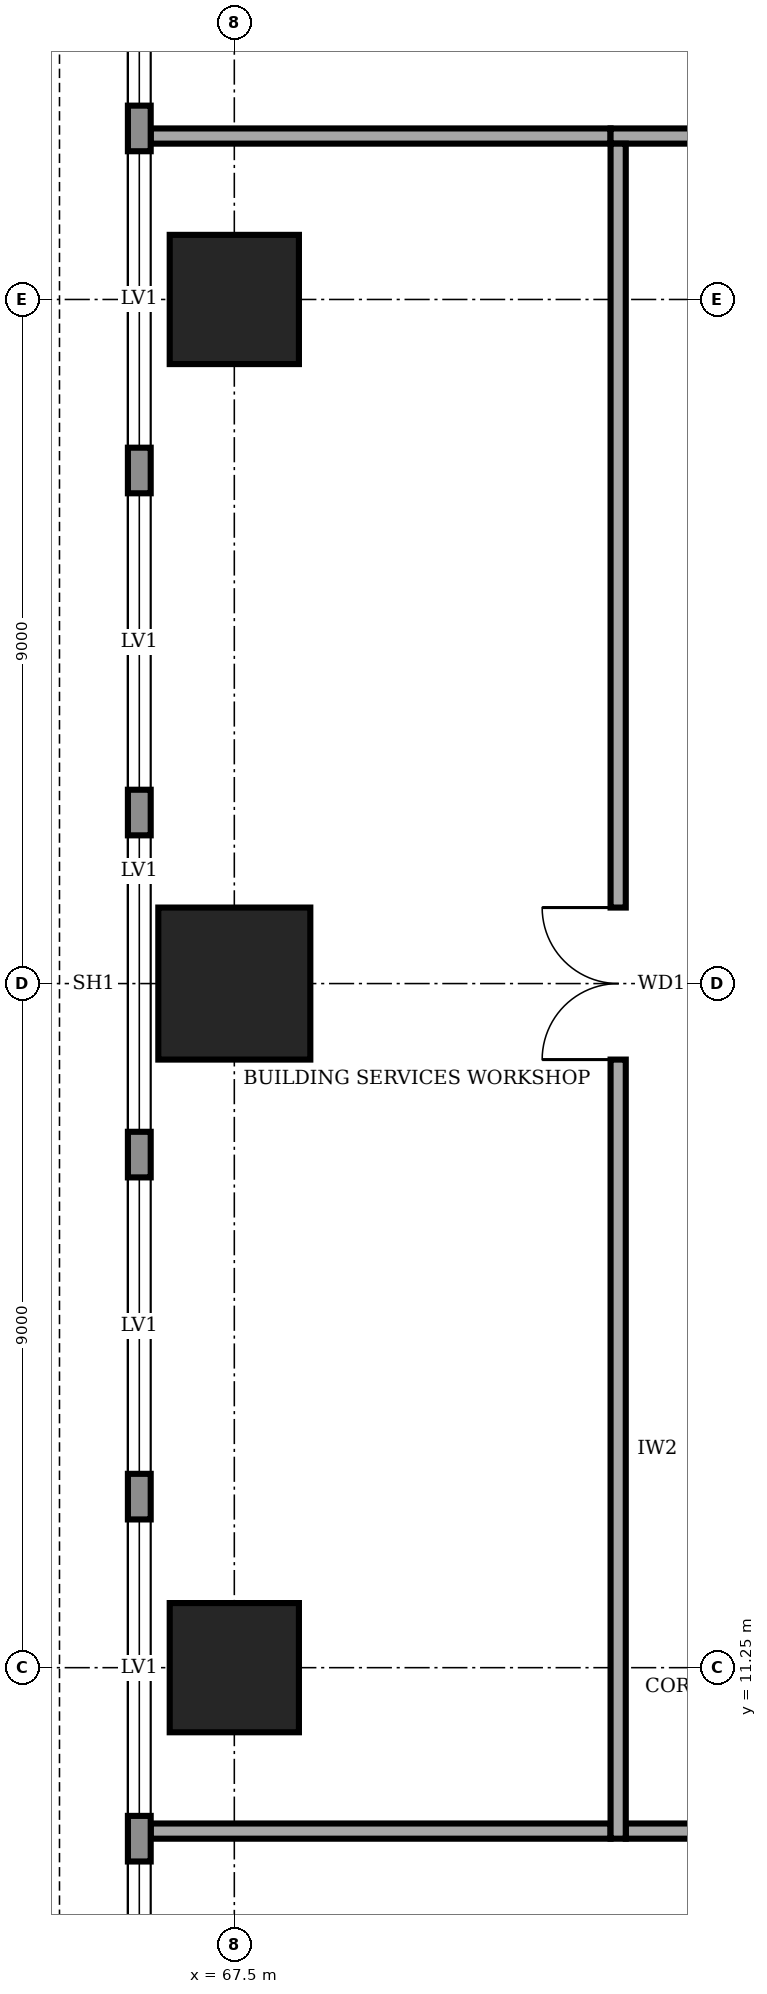
"""IFC4 building model, lengths in metres.
Left out: names, types, materials, properties, quantities, classifications, styles, units other than length and angle.
Written with IfcOpenShell. Run it as: python <this file> out.ifc"""

import sys

from ifc_helpers import new_model, si_unit, direction, frame, frame_2d, origin, origin_2d, place, context, subcontext, project, spatial, rectangle, extrude, element, fill, save


model = new_model("IFC4")
c1 = context("Model", 3, precision=1e-05, world=origin(), true_north=direction((0.0, 1.0)))
c2 = subcontext(c1, "Body", "Model", "MODEL_VIEW")
j1 = project(units=[si_unit("LENGTHUNIT", "METRE"), si_unit("PLANEANGLEUNIT", "RADIAN")], contexts=[c1])
p1 = place(None, origin())
s1 = spatial("IfcSite", under=j1, at=p1, CompositionType="ELEMENT")
p2 = place(p1, origin())
s2 = spatial("IfcBuilding", under=s1, at=p2, CompositionType="ELEMENT")
p3 = place(p2, frame((0.0, 0.0, 229.0)))
s3 = spatial("IfcBuildingStorey", under=s2, at=p3, CompositionType="ELEMENT", Elevation=229.0)
p4 = place(p3, frame((67.5, 11.25, 0.0), z_axis=(0.0, 0.0, 1.0), x_axis=(1.0, 0.0, 0.0)))
e1 = element("IfcColumn", 1, at=p4, inside=s3, PredefinedType="COLUMN", context=c2, shape_type="SweptSolid", body=[
    extrude(rectangle(XDim=1.7, YDim=1.7, at=origin_2d()), origin(), (0.0, 0.0, 1.0), 4.0),
])
p5 = place(p3, frame((67.5, 20.25, 0.0), z_axis=(0.0, 0.0, 1.0), x_axis=(1.0, 0.0, 0.0)))
e2 = element("IfcColumn", 2, at=p5, inside=s3, PredefinedType="COLUMN", context=c2, shape_type="SweptSolid", body=[
    extrude(rectangle(XDim=2.0, YDim=2.0, at=origin_2d()), origin(), (0.0, 0.0, 1.0), 4.0),
])
p6 = place(p3, frame((67.5, 29.25, 0.0), z_axis=(0.0, 0.0, 1.0), x_axis=(1.0, 0.0, 0.0)))
e3 = element("IfcColumn", 3, at=p6, inside=s3, PredefinedType="COLUMN", context=c2, shape_type="SweptSolid", body=[
    extrude(rectangle(XDim=1.7, YDim=1.7, at=origin_2d()), origin(), (0.0, 0.0, 1.0), 4.0),
])
p7 = place(p3, frame((66.25, 37.18, 0.0), z_axis=(0.0, 0.0, 1.0), x_axis=(0.0, -1.0, 0.0)))
e4 = element("IfcWall", 4, at=p7, inside=s3, PredefinedType="STANDARD", context=c2, shape_type="SweptSolid", body=[
    extrude(rectangle(XDim=33.86, YDim=0.3, at=frame_2d((16.93, 0.0))), origin(), (0.0, 0.0, 1.0), 3.75),
])
p8 = place(p7, frame((28.48, 0.0, 0.9)))
e5 = element("IfcOpeningElement", 5, at=p8, cuts=e4, PredefinedType="OPENING", context=c2, shape_type="SweptSolid", body=[
    extrude(rectangle(XDim=3.9, YDim=2.2, at=frame_2d((1.95, 1.1))), frame((0.0, 0.16, 0.0), z_axis=(0.0, -1.0, 0.0), x_axis=(1.0, 0.0, 0.0)), (0.0, 0.0, 1.0), 0.32),
])
p9 = place(p7, frame((23.98, 0.0, 0.9)))
e6 = element("IfcOpeningElement", 6, at=p9, cuts=e4, PredefinedType="OPENING", context=c2, shape_type="SweptSolid", body=[
    extrude(rectangle(XDim=3.9, YDim=2.2, at=frame_2d((1.95, 1.1))), frame((0.0, 0.16, 0.0), z_axis=(0.0, -1.0, 0.0), x_axis=(1.0, 0.0, 0.0)), (0.0, 0.0, 1.0), 0.32),
])
p10 = place(p7, frame((19.48, 0.0, 0.9)))
e7 = element("IfcOpeningElement", 7, at=p10, cuts=e4, PredefinedType="OPENING", context=c2, shape_type="SweptSolid", body=[
    extrude(rectangle(XDim=3.9, YDim=2.2, at=frame_2d((1.95, 1.1))), frame((0.0, 0.16, 0.0), z_axis=(0.0, -1.0, 0.0), x_axis=(1.0, 0.0, 0.0)), (0.0, 0.0, 1.0), 0.32),
])
p11 = place(p7, frame((14.98, 0.0, 0.9)))
e8 = element("IfcOpeningElement", 8, at=p11, cuts=e4, PredefinedType="OPENING", context=c2, shape_type="SweptSolid", body=[
    extrude(rectangle(XDim=3.9, YDim=2.2, at=frame_2d((1.95, 1.1))), frame((0.0, 0.16, 0.0), z_axis=(0.0, -1.0, 0.0), x_axis=(1.0, 0.0, 0.0)), (0.0, 0.0, 1.0), 0.32),
])
p12 = place(p7, frame((10.48, 0.0, 0.9)))
e9 = element("IfcOpeningElement", 9, at=p12, cuts=e4, PredefinedType="OPENING", context=c2, shape_type="SweptSolid", body=[
    extrude(rectangle(XDim=3.9, YDim=2.2, at=frame_2d((1.95, 1.1))), frame((0.0, 0.16, 0.0), z_axis=(0.0, -1.0, 0.0), x_axis=(1.0, 0.0, 0.0)), (0.0, 0.0, 1.0), 0.32),
])
p13 = place(p7, frame((5.98, 0.0, 0.9)))
e10 = element("IfcOpeningElement", 10, at=p13, cuts=e4, PredefinedType="OPENING", context=c2, shape_type="SweptSolid", body=[
    extrude(rectangle(XDim=3.9, YDim=2.2, at=frame_2d((1.95, 1.1))), frame((0.0, 0.16, 0.0), z_axis=(0.0, -1.0, 0.0), x_axis=(1.0, 0.0, 0.0)), (0.0, 0.0, 1.0), 0.32),
])
p14 = place(p7, frame((1.48, 0.0, 0.9)))
e11 = element("IfcOpeningElement", 11, at=p14, cuts=e4, PredefinedType="OPENING", context=c2, shape_type="SweptSolid", body=[
    extrude(rectangle(XDim=3.9, YDim=2.2, at=frame_2d((1.95, 1.1))), frame((0.0, 0.16, 0.0), z_axis=(0.0, -1.0, 0.0), x_axis=(1.0, 0.0, 0.0)), (0.0, 0.0, 1.0), 0.32),
])
p15 = place(p3, frame((72.65, 9.1, 0.0), z_axis=(0.0, 0.0, 1.0), x_axis=(1.0, 0.0, 0.0)))
e12 = element("IfcWall", 12, at=p15, inside=s3, PredefinedType="SOLIDWALL", context=c2, shape_type="SweptSolid", body=[
    extrude(rectangle(XDim=16.9, YDim=0.2, at=frame_2d((8.45, 0.0))), origin(), (0.0, 0.0, 1.0), 3.75),
])
p16 = place(p15, frame((7.15, 0.0, 0.0)))
e13 = element("IfcOpeningElement", 13, at=p16, cuts=e12, PredefinedType="OPENING", context=c2, shape_type="SweptSolid", body=[
    extrude(rectangle(XDim=2.4, YDim=2.7, at=frame_2d((1.2, 1.35))), frame((0.0, 0.11, 0.0), z_axis=(0.0, -1.0, 0.0), x_axis=(1.0, 0.0, 0.0)), (0.0, 0.0, 1.0), 0.22),
])
p17 = place(p3, frame((89.35, 31.4, 0.0), z_axis=(0.0, 0.0, 1.0), x_axis=(-1.0, 0.0, 0.0)))
e14 = element("IfcWall", 14, at=p17, inside=s3, PredefinedType="SOLIDWALL", context=c2, shape_type="SweptSolid", body=[
    extrude(rectangle(XDim=16.9, YDim=0.2, at=frame_2d((8.45, 0.0))), origin(), (0.0, 0.0, 1.0), 3.75),
])
p18 = place(p17, frame((11.425, 0.0, 0.0)))
e15 = element("IfcOpeningElement", 15, at=p18, cuts=e14, PredefinedType="OPENING", context=c2, shape_type="SweptSolid", body=[
    extrude(rectangle(XDim=2.4, YDim=2.7, at=frame_2d((1.2, 1.35))), frame((0.0, 0.11, 0.0), z_axis=(0.0, -1.0, 0.0), x_axis=(1.0, 0.0, 0.0)), (0.0, 0.0, 1.0), 0.22),
])
p19 = place(p17, frame((3.575, 0.0, 0.0)))
e16 = element("IfcOpeningElement", 16, at=p19, cuts=e14, PredefinedType="OPENING", context=c2, shape_type="SweptSolid", body=[
    extrude(rectangle(XDim=1.0, YDim=2.1, at=frame_2d((0.5, 1.05))), frame((0.0, 0.11, 0.0), z_axis=(0.0, -1.0, 0.0), x_axis=(1.0, 0.0, 0.0)), (0.0, 0.0, 1.0), 0.22),
])
p20 = place(p3, frame((72.55, 31.3, 0.0), z_axis=(0.0, 0.0, 1.0), x_axis=(0.0, -1.0, 0.0)))
e17 = element("IfcWall", 17, at=p20, inside=s3, PredefinedType="SOLIDWALL", context=c2, shape_type="SweptSolid", body=[
    extrude(rectangle(XDim=22.3, YDim=0.2, at=frame_2d((11.15, 0.0))), origin(), (0.0, 0.0, 1.0), 3.75),
])
p21 = place(p20, frame((10.05, 0.0, 0.0)))
e18 = element("IfcOpeningElement", 18, at=p21, cuts=e17, PredefinedType="OPENING", context=c2, shape_type="SweptSolid", body=[
    extrude(rectangle(XDim=2.0, YDim=2.1, at=frame_2d((1.0, 1.05))), frame((0.0, 0.11, 0.0), z_axis=(0.0, -1.0, 0.0), x_axis=(1.0, 0.0, 0.0)), (0.0, 0.0, 1.0), 0.22),
])
for number, where, z_axis, x_axis in (
    (19, (66.4, 9.1, 0.0), (0.0, 0.0, 1.0), (1.0, 0.0, 0.0)),
    (20, (66.4, 31.4, 0.0), (0.0, 0.0, 1.0), (1.0, 0.0, 0.0)),
):
    element("IfcWall", number, at=place(p3, frame(where, z_axis=z_axis, x_axis=x_axis)), inside=s3, PredefinedType="SOLIDWALL", context=c2, shape_type="SweptSolid", body=[
        extrude(rectangle(XDim=6.05, YDim=0.2, at=frame_2d((3.025, 0.0))), origin(), (0.0, 0.0, 1.0), 3.75),
    ])
p22 = place(p8, origin())
e21 = element("IfcWindow", 21, at=p22, inside=s3, PartitioningType="SINGLE_PANEL", PredefinedType="WINDOW", context=c2, shape_type="SweptSolid", body=[
    extrude(rectangle(XDim=3.9, YDim=2.2, at=frame_2d((1.95, 1.1))), frame((0.0, 0.03, 0.0), z_axis=(0.0, -1.0, 0.0), x_axis=(1.0, 0.0, 0.0)), (0.0, 0.0, 1.0), 0.06),
])
fill(e5, e21)
p23 = place(p9, origin())
e22 = element("IfcWindow", 22, at=p23, inside=s3, PartitioningType="SINGLE_PANEL", PredefinedType="WINDOW", context=c2, shape_type="SweptSolid", body=[
    extrude(rectangle(XDim=3.9, YDim=2.2, at=frame_2d((1.95, 1.1))), frame((0.0, 0.03, 0.0), z_axis=(0.0, -1.0, 0.0), x_axis=(1.0, 0.0, 0.0)), (0.0, 0.0, 1.0), 0.06),
])
fill(e6, e22)
p24 = place(p10, origin())
e23 = element("IfcWindow", 23, at=p24, inside=s3, PartitioningType="SINGLE_PANEL", PredefinedType="WINDOW", context=c2, shape_type="SweptSolid", body=[
    extrude(rectangle(XDim=3.9, YDim=2.2, at=frame_2d((1.95, 1.1))), frame((0.0, 0.03, 0.0), z_axis=(0.0, -1.0, 0.0), x_axis=(1.0, 0.0, 0.0)), (0.0, 0.0, 1.0), 0.06),
])
fill(e7, e23)
p25 = place(p11, origin())
e24 = element("IfcWindow", 24, at=p25, inside=s3, PartitioningType="SINGLE_PANEL", PredefinedType="WINDOW", context=c2, shape_type="SweptSolid", body=[
    extrude(rectangle(XDim=3.9, YDim=2.2, at=frame_2d((1.95, 1.1))), frame((0.0, 0.03, 0.0), z_axis=(0.0, -1.0, 0.0), x_axis=(1.0, 0.0, 0.0)), (0.0, 0.0, 1.0), 0.06),
])
fill(e8, e24)
p26 = place(p12, origin())
e25 = element("IfcWindow", 25, at=p26, inside=s3, PartitioningType="SINGLE_PANEL", PredefinedType="WINDOW", context=c2, shape_type="SweptSolid", body=[
    extrude(rectangle(XDim=3.9, YDim=2.2, at=frame_2d((1.95, 1.1))), frame((0.0, 0.03, 0.0), z_axis=(0.0, -1.0, 0.0), x_axis=(1.0, 0.0, 0.0)), (0.0, 0.0, 1.0), 0.06),
])
fill(e9, e25)
p27 = place(p13, origin())
e26 = element("IfcWindow", 26, at=p27, inside=s3, PartitioningType="SINGLE_PANEL", PredefinedType="WINDOW", context=c2, shape_type="SweptSolid", body=[
    extrude(rectangle(XDim=3.9, YDim=2.2, at=frame_2d((1.95, 1.1))), frame((0.0, 0.03, 0.0), z_axis=(0.0, -1.0, 0.0), x_axis=(1.0, 0.0, 0.0)), (0.0, 0.0, 1.0), 0.06),
])
fill(e10, e26)
p28 = place(p14, origin())
e27 = element("IfcWindow", 27, at=p28, inside=s3, PartitioningType="SINGLE_PANEL", PredefinedType="WINDOW", context=c2, shape_type="SweptSolid", body=[
    extrude(rectangle(XDim=3.9, YDim=2.2, at=frame_2d((1.95, 1.1))), frame((0.0, 0.03, 0.0), z_axis=(0.0, -1.0, 0.0), x_axis=(1.0, 0.0, 0.0)), (0.0, 0.0, 1.0), 0.06),
])
fill(e11, e27)
p29 = place(p21, frame((2.0, 0.0, 0.0), z_axis=(0.0, 0.0, 1.0), x_axis=(-1.0, 0.0, 0.0)))
e28 = element("IfcDoor", 28, at=p29, inside=s3, OperationType="DOUBLE_DOOR_SINGLE_SWING", PredefinedType="DOOR", context=c2, shape_type="SweptSolid", body=[
    extrude(rectangle(XDim=2.0, YDim=2.1, at=frame_2d((1.0, 1.05))), frame((0.0, 0.025, 0.0), z_axis=(0.0, -1.0, 0.0), x_axis=(1.0, 0.0, 0.0)), (0.0, 0.0, 1.0), 0.05),
])
fill(e18, e28)
save(model, sys.argv[1])
